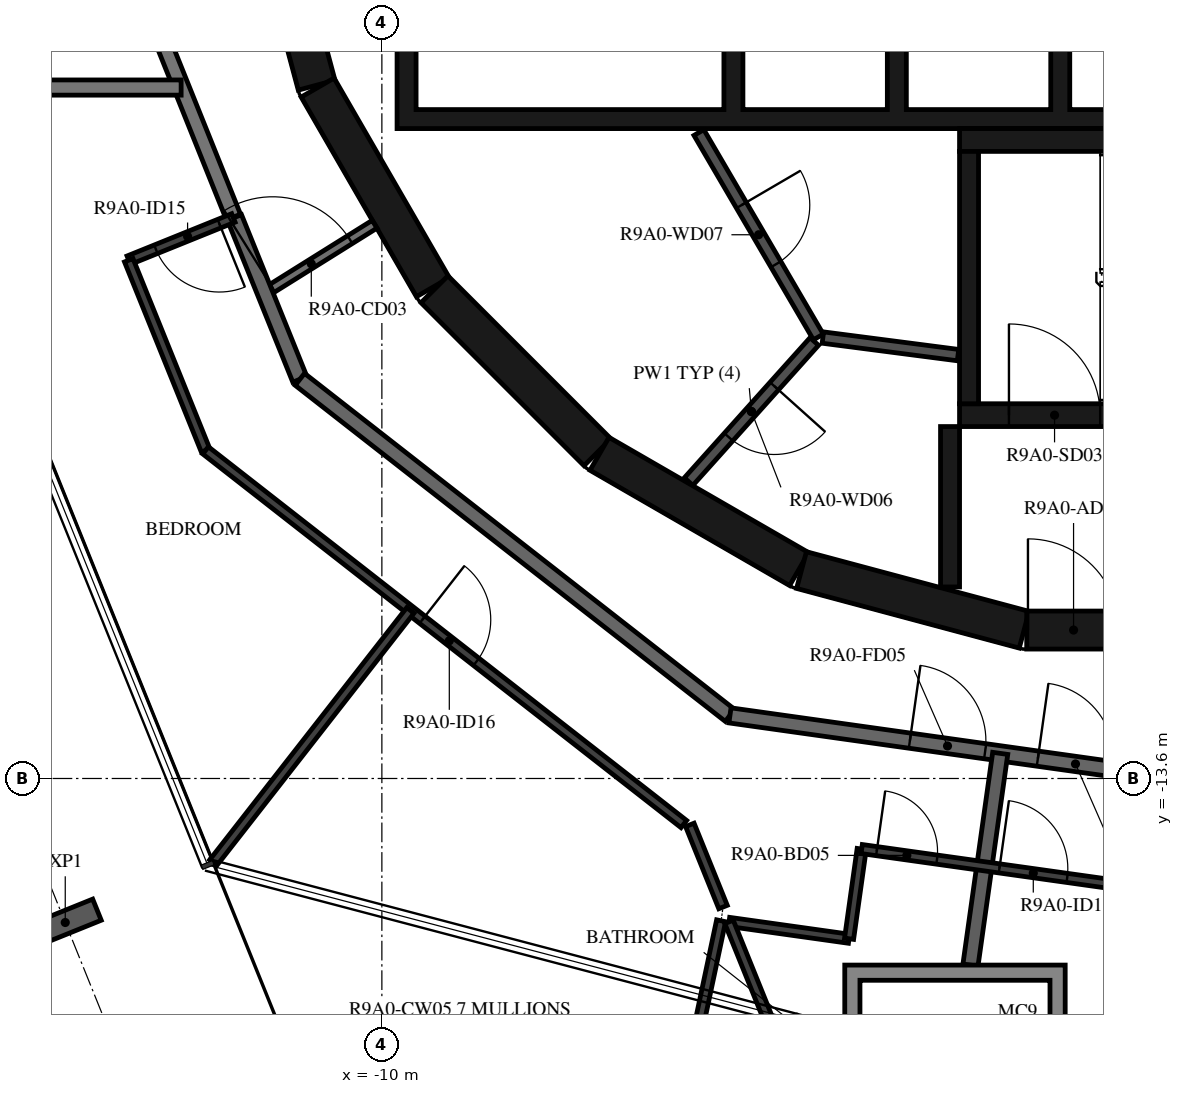
"""IFC4 building model, lengths in metres.
Left out: names, types, materials, properties, quantities, classifications, styles, units other than length and angle.
Written with IfcOpenShell. Run it as: python <this file> out.ifc"""

import sys

from ifc_helpers import new_model, si_unit, direction, frame, frame_2d, origin, origin_2d, place, context, subcontext, project, spatial, polyline, rectangle, i_section, outline, extrude, element, fill, save


model = new_model("IFC4")
c1 = context("Model", 3, precision=1e-05, world=origin(), true_north=direction((0.0, 1.0)))
c2 = subcontext(c1, "Body", "Model", "MODEL_VIEW")
j1 = project(units=[si_unit("LENGTHUNIT", "METRE"), si_unit("PLANEANGLEUNIT", "RADIAN")], contexts=[c1])
p1 = place(None, origin())
s1 = spatial("IfcSite", under=j1, at=p1, CompositionType="ELEMENT")
p2 = place(p1, origin())
s2 = spatial("IfcBuilding", under=s1, at=p2, CompositionType="ELEMENT")
p3 = place(p2, frame((0.0, 0.0, 340.0)))
s3 = spatial("IfcBuildingStorey", under=s2, at=p3, CompositionType="ELEMENT", Elevation=340.0)
p4 = place(p3, frame((-14.166, -15.495, -0.38), z_axis=(0.0, 0.0, 1.0), x_axis=(-0.374606892434, 0.927183733755, 0.0)))
e1 = element("IfcColumn", 1, at=p4, inside=s3, PredefinedType="COLUMN", context=c2, shape_type="SweptSolid", body=[
    extrude(i_section(OverallWidth=0.3, OverallDepth=0.9, WebThickness=0.019, FlangeThickness=0.035, FilletRadius=0.03, at=origin_2d()), origin(), (0.0, 0.0, 1.0), 3.5),
])
p5 = place(p3, frame((-11.643, -1.55, 0.0), z_axis=(0.0, 0.0, 1.0), x_axis=(0.258734743916, -0.965948410781, 0.0)))
e2 = element("IfcWall", 2, at=p5, inside=s3, PredefinedType="SHEAR", context=c2, shape_type="SweptSolid", body=[
    extrude(rectangle(XDim=3.033, YDim=0.5, at=frame_2d((1.516, 0.0))), origin(), (0.0, 0.0, 1.0), 3.12),
])
p6 = place(p5, frame((1.066, 0.0, 0.0)))
e3 = element("IfcOpeningElement", 3, at=p6, cuts=e2, PredefinedType="OPENING", context=c2, shape_type="SweptSolid", body=[
    extrude(rectangle(XDim=0.9, YDim=2.1, at=frame_2d((0.45, 1.05))), frame((0.0, 0.26, 0.0), z_axis=(0.0, -1.0, 0.0), x_axis=(1.0, 0.0, 0.0)), (0.0, 0.0, 1.0), 0.52),
])
p7 = place(p3, frame((-10.845, -4.51, 0.0), z_axis=(0.0, 0.0, 1.0), x_axis=(0.500087131594, -0.865975092491, 0.0)))
e4 = element("IfcWall", 4, at=p7, inside=s3, PredefinedType="SHEAR", context=c2, shape_type="SweptSolid", body=[
    extrude(rectangle(XDim=3.033, YDim=0.5, at=frame_2d((1.516, 0.0))), origin(), (0.0, 0.0, 1.0), 3.12),
])
p8 = place(p3, frame((-9.308, -7.164, 0.0), z_axis=(0.0, 0.0, 1.0), x_axis=(0.707106781187, -0.707106781187, 0.0)))
e5 = element("IfcWall", 5, at=p8, inside=s3, PredefinedType="SHEAR", context=c2, shape_type="SweptSolid", body=[
    extrude(rectangle(XDim=3.032, YDim=0.5, at=frame_2d((1.516, 0.0))), origin(), (0.0, 0.0, 1.0), 3.12),
])
for number, where, z_axis, x_axis in (
    (6, (-7.137, -9.329, 0.0), (0.0, 0.0, 1.0), (0.866, -0.5, 0.0)),
    (7, (-4.479, -10.858, 0.0), (0.0, 0.0, 1.0), (0.966, -0.259, 0.0)),
):
    element("IfcWall", number, at=place(p3, frame(where, z_axis=z_axis, x_axis=x_axis)), inside=s3, PredefinedType="SHEAR", context=c2, shape_type="SweptSolid", body=[
        extrude(rectangle(XDim=3.033, YDim=0.5, at=frame_2d((1.516, 0.0))), origin(), (0.0, 0.0, 1.0), 3.12),
    ])
p9 = place(p3, frame((-1.516, -11.647, 0.0), z_axis=(0.0, 0.0, 1.0), x_axis=(1.0, 0.0, 0.0)))
e8 = element("IfcWall", 8, at=p9, inside=s3, PredefinedType="SHEAR", context=c2, shape_type="SweptSolid", body=[
    extrude(rectangle(XDim=3.033, YDim=0.5, at=frame_2d((1.516, 0.0))), origin(), (0.0, 0.0, 1.0), 3.12),
])
p10 = place(p9, frame((0.016, 0.0, 0.0)))
e9 = element("IfcOpeningElement", 9, at=p10, cuts=e8, PredefinedType="OPENING", context=c2, shape_type="SweptSolid", body=[
    extrude(rectangle(XDim=1.2, YDim=2.1, at=frame_2d((0.6, 1.05))), frame((0.0, 0.26, 0.0), z_axis=(0.0, -1.0, 0.0), x_axis=(1.0, 0.0, 0.0)), (0.0, 0.0, 1.0), 0.52),
])
p11 = place(p3, frame((-2.275, -8.67, 0.0), z_axis=(0.0, 0.0, 1.0), x_axis=(0.0, 1.0, 0.0)))
e10 = element("IfcWall", 10, at=p11, inside=s3, PredefinedType="SHEAR", context=c2, shape_type="SweptSolid", body=[
    extrude(rectangle(XDim=3.32, YDim=0.25, at=frame_2d((1.66, 0.0))), origin(), (0.0, 0.0, 1.0), 3.12),
])
p12 = place(p3, frame((-2.4, -5.2, 0.0), z_axis=(0.0, 0.0, 1.0), x_axis=(1.0, 0.0, 0.0)))
e11 = element("IfcWall", 11, at=p12, inside=s3, PredefinedType="SHEAR", context=c2, shape_type="SweptSolid", body=[
    extrude(rectangle(XDim=7.05, YDim=0.3, at=frame_2d((3.525, 0.0))), origin(), (0.0, 0.0, 1.0), 3.12),
])
p13 = place(p3, frame((-2.4, -8.82, 0.0), z_axis=(0.0, 0.0, 1.0), x_axis=(1.0, 0.0, 0.0)))
e12 = element("IfcWall", 12, at=p13, inside=s3, PredefinedType="SHEAR", context=c2, shape_type="SweptSolid", body=[
    extrude(rectangle(XDim=2.5, YDim=0.3, at=frame_2d((1.25, 0.0))), origin(), (0.0, 0.0, 1.0), 3.12),
])
p14 = place(p13, frame((0.65, 0.0, 0.0)))
e13 = element("IfcOpeningElement", 13, at=p14, cuts=e12, PredefinedType="OPENING", context=c2, shape_type="SweptSolid", body=[
    extrude(rectangle(XDim=1.2, YDim=2.1, at=frame_2d((0.6, 1.05))), frame((0.0, 0.16, 0.0), z_axis=(0.0, -1.0, 0.0), x_axis=(1.0, 0.0, 0.0)), (0.0, 0.0, 1.0), 0.32),
])
p15 = place(p3, frame((-2.525, -8.97, 0.0), z_axis=(0.0, 0.0, 1.0), x_axis=(0.0, -1.0, 0.0)))
e14 = element("IfcWall", 14, at=p15, inside=s3, PredefinedType="SHEAR", context=c2, shape_type="SweptSolid", body=[
    extrude(rectangle(XDim=2.11, YDim=0.25, at=frame_2d((1.055, 0.0))), origin(), (0.0, 0.0, 1.0), 3.12),
])
p16 = place(p3, origin())
e15 = element("IfcWall", 15, at=p16, inside=s3, PredefinedType="SHEAR", context=c2, shape_type="SweptSolid", body=[
    extrude(outline(polyline([(9.8, -5.05), (9.8, -4.8), (9.8, -1.9), (9.55, -1.9), (9.55, -4.8), (7.65, -4.8), (7.65, -1.9), (7.4, -1.9), (7.4, -4.8), (5.5, -4.8), (5.5, -1.9), (5.25, -1.9), (5.25, -4.8), (3.35, -4.8), (3.35, -1.9), (3.1, -1.9), (3.1, -4.8), (1.2, -4.8), (1.2, -1.9), (0.95, -1.9), (0.95, -4.8), (-0.95, -4.8), (-0.95, -1.9), (-1.2, -1.9), (-1.2, -4.8), (-3.1, -4.8), (-3.1, -1.9), (-3.35, -1.9), (-3.35, -4.8), (-5.25, -4.8), (-5.25, -1.9), (-5.5, -1.9), (-5.5, -4.8), (-9.55, -4.8), (-9.55, -1.9), (-9.8, -1.9), (-9.8, -4.8), (-9.8, -5.05), (9.8, -5.05)])), origin(), (0.0, 0.0, 1.0), 3.12),
])
p17 = place(p3, frame((-5.829, -5.102, 0.0), z_axis=(0.0, 0.0, 1.0), x_axis=(0.504480008384, -0.863423373057, 0.0)))
e16 = element("IfcWall", 16, at=p17, inside=s3, PredefinedType="PARTITIONING", context=c2, shape_type="SweptSolid", body=[
    extrude(rectangle(XDim=3.115, YDim=0.15, at=frame_2d((1.558, 0.0))), origin(), (0.0, 0.0, 1.0), 3.12),
])
p18 = place(p17, frame((1.107, 0.0, 0.0)))
e17 = element("IfcOpeningElement", 17, at=p18, cuts=e16, PredefinedType="OPENING", context=c2, shape_type="SweptSolid", body=[
    extrude(rectangle(XDim=0.9, YDim=2.1, at=frame_2d((0.45, 1.05))), frame((0.0, 0.085, 0.0), z_axis=(0.0, -1.0, 0.0), x_axis=(1.0, 0.0, 0.0)), (0.0, 0.0, 1.0), 0.17),
])
p19 = place(p3, frame((-4.311, -7.851, 0.0), z_axis=(0.0, 0.0, 1.0), x_axis=(-0.667869133096, -0.744278725383, 0.0)))
e18 = element("IfcWall", 18, at=p19, inside=s3, PredefinedType="PARTITIONING", context=c2, shape_type="SweptSolid", body=[
    extrude(rectangle(XDim=2.476, YDim=0.15, at=frame_2d((1.238, 0.0))), origin(), (0.0, 0.0, 1.0), 3.12),
])
p20 = place(p19, frame((0.788, 0.0, 0.0)))
e19 = element("IfcOpeningElement", 19, at=p20, cuts=e18, PredefinedType="OPENING", context=c2, shape_type="SweptSolid", body=[
    extrude(rectangle(XDim=0.9, YDim=2.1, at=frame_2d((0.45, 1.05))), frame((0.0, 0.085, 0.0), z_axis=(0.0, -1.0, 0.0), x_axis=(1.0, 0.0, 0.0)), (0.0, 0.0, 1.0), 0.17),
])
p21 = place(p3, frame((-4.198, -7.799, 0.0), z_axis=(0.0, 0.0, 1.0), x_axis=(0.991686747293, -0.128675542523, 0.0)))
e20 = element("IfcWall", 20, at=p21, inside=s3, PredefinedType="PARTITIONING", context=c2, shape_type="SweptSolid", body=[
    extrude(rectangle(XDim=1.793, YDim=0.15, at=frame_2d((0.896, 0.0))), origin(), (0.0, 0.0, 1.0), 3.12),
])
p22 = place(p3, frame((-11.539, -7.21, 0.0), z_axis=(0.0, 0.0, 1.0), x_axis=(0.848103039868, 0.529831325769, 0.0)))
e21 = element("IfcWall", 21, at=p22, inside=s3, PredefinedType="PARTITIONING", context=c2, shape_type="SweptSolid", body=[
    extrude(rectangle(XDim=1.702, YDim=0.12, at=frame_2d((0.851, 0.0))), origin(), (0.0, 0.0, 1.0), 3.12),
])
p23 = place(p22, frame((0.12, 0.0, 0.0)))
e22 = element("IfcOpeningElement", 22, at=p23, cuts=e21, PredefinedType="OPENING", context=c2, shape_type="SweptSolid", body=[
    extrude(rectangle(XDim=1.2, YDim=2.1, at=frame_2d((0.6, 1.05))), frame((0.0, 0.07, 0.0), z_axis=(0.0, -1.0, 0.0), x_axis=(1.0, 0.0, 0.0)), (0.0, 0.0, 1.0), 0.14),
])
p24 = place(p3, frame((-13.769, -1.691, 0.0), z_axis=(0.0, 0.0, 1.0), x_axis=(0.372720094028, -0.927943819155, 0.0)))
e23 = element("IfcWall", 23, at=p24, inside=s3, PredefinedType="STANDARD", context=c2, shape_type="SweptSolid", body=[
    extrude(rectangle(XDim=4.875, YDim=0.2, at=frame_2d((2.438, 0.0))), origin(), (0.0, 0.0, 1.0), 3.12),
])
p25 = place(p3, frame((-11.939, -6.22, 0.0), z_axis=(0.0, 0.0, 1.0), x_axis=(0.374651128394, -0.927165860024, 0.0)))
e24 = element("IfcWall", 24, at=p25, inside=s3, PredefinedType="STANDARD", context=c2, shape_type="SweptSolid", body=[
    extrude(rectangle(XDim=2.296, YDim=0.2, at=frame_2d((1.148, 0.0))), origin(), (0.0, 0.0, 1.0), 3.12),
])
p26 = place(p3, frame((-11.079, -8.349, 0.0), z_axis=(0.0, 0.0, 1.0), x_axis=(0.78800478687, -0.615669112324, 0.0)))
e25 = element("IfcWall", 25, at=p26, inside=s3, PredefinedType="STANDARD", context=c2, shape_type="SweptSolid", body=[
    extrude(rectangle(XDim=7.181, YDim=0.2, at=frame_2d((3.591, 0.0))), origin(), (0.0, 0.0, 1.0), 3.12),
])
p27 = place(p3, frame((-5.42, -12.77, 0.0), z_axis=(0.0, 0.0, 1.0), x_axis=(0.990270565508, -0.139155334385, 0.0)))
e26 = element("IfcWall", 26, at=p27, inside=s3, PredefinedType="STANDARD", context=c2, shape_type="SweptSolid", body=[
    extrude(rectangle(XDim=7.181, YDim=0.2, at=frame_2d((3.59, 0.0))), origin(), (0.0, 0.0, 1.0), 3.12),
])
p28 = place(p27, frame((2.39, 0.0, 0.0)))
e27 = element("IfcOpeningElement", 27, at=p28, cuts=e26, PredefinedType="OPENING", context=c2, shape_type="SweptSolid", body=[
    extrude(rectangle(XDim=1.0, YDim=2.1, at=frame_2d((0.5, 1.05))), frame((0.0, 0.11, 0.0), z_axis=(0.0, -1.0, 0.0), x_axis=(1.0, 0.0, 0.0)), (0.0, 0.0, 1.0), 0.22),
])
p29 = place(p27, frame((4.091, 0.0, 0.0)))
e28 = element("IfcOpeningElement", 28, at=p29, cuts=e26, PredefinedType="OPENING", context=c2, shape_type="SweptSolid", body=[
    extrude(rectangle(XDim=1.0, YDim=2.1, at=frame_2d((0.5, 1.05))), frame((0.0, 0.11, 0.0), z_axis=(0.0, -1.0, 0.0), x_axis=(1.0, 0.0, 0.0)), (0.0, 0.0, 1.0), 0.22),
])
p30 = place(p3, frame((-15.074, -4.51, 0.0), z_axis=(0.0, 0.0, 1.0), x_axis=(1.0, 0.0, 0.0)))
e29 = element("IfcWall", 29, at=p30, inside=s3, PredefinedType="STANDARD", context=c2, shape_type="SweptSolid", body=[
    extrude(rectangle(XDim=2.433, YDim=0.2, at=frame_2d((1.216, 0.0))), origin(), (0.0, 0.0, 1.0), 3.12),
])
p31 = place(p3, frame((-2.256, -16.055, 0.0), z_axis=(0.0, 0.0, 1.0), x_axis=(0.139148428478, 0.990271535919, 0.0)))
e30 = element("IfcWall", 30, at=p31, inside=s3, PredefinedType="STANDARD", context=c2, shape_type="SweptSolid", body=[
    extrude(rectangle(XDim=2.812, YDim=0.2, at=frame_2d((1.406, 0.0))), origin(), (0.0, 0.0, 1.0), 3.12),
])
p32 = place(p3, frame((-11.953, -6.225, 0.0), z_axis=(0.0, 0.0, 1.0), x_axis=(-0.927144096717, -0.374704982518, 0.0)))
e31 = element("IfcWall", 31, at=p32, inside=s3, PredefinedType="PARTITIONING", context=c2, shape_type="SweptSolid", body=[
    extrude(rectangle(XDim=1.485, YDim=0.12, at=frame_2d((0.742, 0.0))), origin(), (0.0, 0.0, 1.0), 3.12),
])
p33 = place(p32, frame((0.2, 0.0, 0.0)))
e32 = element("IfcOpeningElement", 32, at=p33, cuts=e31, PredefinedType="OPENING", context=c2, shape_type="SweptSolid", body=[
    extrude(rectangle(XDim=0.9, YDim=2.1, at=frame_2d((0.45, 1.05))), frame((0.0, 0.07, 0.0), z_axis=(0.0, -1.0, 0.0), x_axis=(1.0, 0.0, 0.0)), (0.0, 0.0, 1.0), 0.14),
])
p34 = place(p3, frame((-13.33, -6.782, 0.0), z_axis=(0.0, 0.0, 1.0), x_axis=(0.374602180132, -0.927185637637, 0.0)))
e33 = element("IfcWall", 33, at=p34, inside=s3, PredefinedType="PARTITIONING", context=c2, shape_type="SweptSolid", body=[
    extrude(rectangle(XDim=2.698, YDim=0.12, at=frame_2d((1.349, 0.0))), origin(), (0.0, 0.0, 1.0), 3.12),
])
p35 = place(p3, frame((-12.319, -9.283, 0.0), z_axis=(0.0, 0.0, 1.0), x_axis=(0.788000268464, -0.61567489546, 0.0)))
e34 = element("IfcWall", 34, at=p35, inside=s3, PredefinedType="PARTITIONING", context=c2, shape_type="SweptSolid", body=[
    extrude(rectangle(XDim=7.985, YDim=0.12, at=frame_2d((3.992, 0.0))), origin(), (0.0, 0.0, 1.0), 3.12),
])
p36 = place(p35, frame((3.619, 0.0, 0.0)))
e35 = element("IfcOpeningElement", 35, at=p36, cuts=e34, PredefinedType="OPENING", context=c2, shape_type="SweptSolid", body=[
    extrude(rectangle(XDim=0.9, YDim=2.1, at=frame_2d((0.45, 1.05))), frame((0.0, 0.07, 0.0), z_axis=(0.0, -1.0, 0.0), x_axis=(1.0, 0.0, 0.0)), (0.0, 0.0, 1.0), 0.14),
])
p37 = place(p3, frame((-5.948, -14.21, 0.0), z_axis=(0.0, 0.0, 1.0), x_axis=(0.374601530156, -0.927185900241, 0.0)))
e36 = element("IfcWall", 36, at=p37, inside=s3, PredefinedType="PARTITIONING", context=c2, shape_type="SweptSolid", body=[
    extrude(rectangle(XDim=1.166, YDim=0.12, at=frame_2d((0.583, 0.0))), origin(), (0.0, 0.0, 1.0), 3.12),
])
p38 = place(p3, frame((-5.433, -15.487, 0.0), z_axis=(0.0, 0.0, 1.0), x_axis=(0.990268451053, -0.139170380644, 0.0)))
e37 = element("IfcWall", 37, at=p38, inside=s3, PredefinedType="PARTITIONING", context=c2, shape_type="SweptSolid", body=[
    extrude(rectangle(XDim=1.595, YDim=0.12, at=frame_2d((0.797, 0.0))), origin(), (0.0, 0.0, 1.0), 3.12),
])
p39 = place(p3, frame((-3.854, -15.708, 0.0), z_axis=(0.0, 0.0, 1.0), x_axis=(0.139298773474, 0.99025039849, 0.0)))
e38 = element("IfcWall", 38, at=p39, inside=s3, PredefinedType="PARTITIONING", context=c2, shape_type="SweptSolid", body=[
    extrude(rectangle(XDim=1.192, YDim=0.12, at=frame_2d((0.596, 0.0))), origin(), (0.0, 0.0, 1.0), 3.12),
])
p40 = place(p3, frame((-3.688, -14.528, 0.0), z_axis=(0.0, 0.0, 1.0), x_axis=(0.990273698817, -0.139133035013, 0.0)))
e39 = element("IfcWall", 39, at=p40, inside=s3, PredefinedType="PARTITIONING", context=c2, shape_type="SweptSolid", body=[
    extrude(rectangle(XDim=4.945, YDim=0.12, at=frame_2d((2.472, 0.0))), origin(), (0.0, 0.0, 1.0), 3.12),
])
p41 = place(p40, frame((0.2, 0.0, 0.0)))
e40 = element("IfcOpeningElement", 40, at=p41, cuts=e39, PredefinedType="OPENING", context=c2, shape_type="SweptSolid", body=[
    extrude(rectangle(XDim=0.8, YDim=2.1, at=frame_2d((0.4, 1.05))), frame((0.0, 0.07, 0.0), z_axis=(0.0, -1.0, 0.0), x_axis=(1.0, 0.0, 0.0)), (0.0, 0.0, 1.0), 0.14),
])
p42 = place(p40, frame((1.83, 0.0, 0.0)))
e41 = element("IfcOpeningElement", 41, at=p42, cuts=e39, PredefinedType="OPENING", context=c2, shape_type="SweptSolid", body=[
    extrude(rectangle(XDim=0.9, YDim=2.1, at=frame_2d((0.45, 1.05))), frame((0.0, 0.07, 0.0), z_axis=(0.0, -1.0, 0.0), x_axis=(1.0, 0.0, 0.0)), (0.0, 0.0, 1.0), 0.14),
])
p43 = place(p3, frame((-12.219, -14.708, 0.0), z_axis=(0.0, 0.0, 1.0), x_axis=(0.615656413137, 0.788014708596, 0.0)))
e42 = element("IfcWall", 42, at=p43, inside=s3, PredefinedType="PARTITIONING", context=c2, shape_type="SweptSolid", body=[
    extrude(rectangle(XDim=4.213, YDim=0.12, at=frame_2d((2.106, 0.0))), origin(), (0.0, 0.0, 1.0), 3.12),
])
p44 = place(p3, frame((-7.305, -23.815, 0.0), z_axis=(0.0, 0.0, 1.0), x_axis=(0.207366409306, 0.978263345062, 0.0)))
e43 = element("IfcWall", 43, at=p44, inside=s3, PredefinedType="PARTITIONING", context=c2, shape_type="SweptSolid", body=[
    extrude(rectangle(XDim=8.529, YDim=0.12, at=frame_2d((4.264, 0.0))), origin(), (0.0, 0.0, 1.0), 3.12),
])
p45 = place(p44, frame((0.4, 0.0, 0.0)))
e44 = element("IfcOpeningElement", 44, at=p45, cuts=e43, PredefinedType="OPENING", context=c2, shape_type="SweptSolid", body=[
    extrude(rectangle(XDim=0.9, YDim=2.1, at=frame_2d((0.45, 1.05))), frame((0.0, 0.07, 0.0), z_axis=(0.0, -1.0, 0.0), x_axis=(1.0, 0.0, 0.0)), (0.0, 0.0, 1.0), 0.14),
])
p46 = place(p3, frame((-4.445, -17.93, 0.0), z_axis=(0.0, 0.0, 1.0), x_axis=(-0.374614676827, 0.927180588616, 0.0)))
e45 = element("IfcWall", 45, at=p46, inside=s3, PredefinedType="PARTITIONING", context=c2, shape_type="SweptSolid", body=[
    extrude(rectangle(XDim=2.635, YDim=0.12, at=frame_2d((1.318, 0.0))), origin(), (0.0, 0.0, 1.0), 3.12),
])
p47 = place(p3, origin())
e46 = element("IfcWall", 46, at=p47, inside=s3, PredefinedType="STANDARD", context=c2, shape_type="SweptSolid", body=[
    extrude(outline(polyline([(-1.01, -16.055), (-1.01, -18.955), (-3.91, -18.955), (-3.91, -16.055), (-1.01, -16.055)]), holes=[polyline([(-3.71, -18.755), (-1.21, -18.755), (-1.21, -16.255), (-3.71, -16.255), (-3.71, -18.755)])]), origin(), (0.0, 0.0, 1.0), 3.12),
])
p48 = place(p14, origin())
e47 = element("IfcDoor", 47, at=p48, inside=s3, OperationType="SINGLE_SWING_LEFT", PredefinedType="DOOR", context=c2, shape_type="SweptSolid", body=[
    extrude(rectangle(XDim=1.2, YDim=2.1, at=frame_2d((0.6, 1.05))), frame((0.0, 0.025, 0.0), z_axis=(0.0, -1.0, 0.0), x_axis=(1.0, 0.0, 0.0)), (0.0, 0.0, 1.0), 0.05),
])
fill(e13, e47)
p49 = place(p10, origin())
e48 = element("IfcDoor", 48, at=p49, inside=s3, OperationType="SINGLE_SWING_RIGHT", PredefinedType="DOOR", context=c2, shape_type="SweptSolid", body=[
    extrude(rectangle(XDim=1.2, YDim=2.1, at=frame_2d((0.6, 1.05))), frame((0.0, 0.025, 0.0), z_axis=(0.0, -1.0, 0.0), x_axis=(1.0, 0.0, 0.0)), (0.0, 0.0, 1.0), 0.05),
])
fill(e9, e48)
p50 = place(p20, origin())
e49 = element("IfcDoor", 49, at=p50, inside=s3, OperationType="SINGLE_SWING_RIGHT", PredefinedType="DOOR", context=c2, shape_type="SweptSolid", body=[
    extrude(rectangle(XDim=0.9, YDim=2.1, at=frame_2d((0.45, 1.05))), frame((0.0, 0.025, 0.0), z_axis=(0.0, -1.0, 0.0), x_axis=(1.0, 0.0, 0.0)), (0.0, 0.0, 1.0), 0.05),
])
fill(e19, e49)
p51 = place(p18, origin())
e50 = element("IfcDoor", 50, at=p51, inside=s3, OperationType="SINGLE_SWING_LEFT", PredefinedType="DOOR", context=c2, shape_type="SweptSolid", body=[
    extrude(rectangle(XDim=0.9, YDim=2.1, at=frame_2d((0.45, 1.05))), frame((0.0, 0.025, 0.0), z_axis=(0.0, -1.0, 0.0), x_axis=(1.0, 0.0, 0.0)), (0.0, 0.0, 1.0), 0.05),
])
fill(e17, e50)
p52 = place(p28, origin())
e51 = element("IfcDoor", 51, at=p52, inside=s3, OperationType="SINGLE_SWING_RIGHT", PredefinedType="DOOR", context=c2, shape_type="SweptSolid", body=[
    extrude(rectangle(XDim=1.0, YDim=2.1, at=frame_2d((0.5, 1.05))), frame((0.0, 0.025, 0.0), z_axis=(0.0, -1.0, 0.0), x_axis=(1.0, 0.0, 0.0)), (0.0, 0.0, 1.0), 0.05),
])
fill(e27, e51)
p53 = place(p33, origin())
e52 = element("IfcDoor", 52, at=p53, inside=s3, OperationType="SINGLE_SWING_LEFT", PredefinedType="DOOR", context=c2, shape_type="SweptSolid", body=[
    extrude(rectangle(XDim=0.9, YDim=2.1, at=frame_2d((0.45, 1.05))), frame((0.0, 0.025, 0.0), z_axis=(0.0, -1.0, 0.0), x_axis=(1.0, 0.0, 0.0)), (0.0, 0.0, 1.0), 0.05),
])
fill(e32, e52)
p54 = place(p36, origin())
e53 = element("IfcDoor", 53, at=p54, inside=s3, OperationType="SINGLE_SWING_RIGHT", PredefinedType="DOOR", context=c2, shape_type="SweptSolid", body=[
    extrude(rectangle(XDim=0.9, YDim=2.1, at=frame_2d((0.45, 1.05))), frame((0.0, 0.025, 0.0), z_axis=(0.0, -1.0, 0.0), x_axis=(1.0, 0.0, 0.0)), (0.0, 0.0, 1.0), 0.05),
])
fill(e35, e53)
p55 = place(p41, origin())
e54 = element("IfcDoor", 54, at=p55, inside=s3, OperationType="SINGLE_SWING_RIGHT", PredefinedType="DOOR", context=c2, shape_type="SweptSolid", body=[
    extrude(rectangle(XDim=0.8, YDim=2.1, at=frame_2d((0.4, 1.05))), frame((0.0, 0.025, 0.0), z_axis=(0.0, -1.0, 0.0), x_axis=(1.0, 0.0, 0.0)), (0.0, 0.0, 1.0), 0.05),
])
fill(e40, e54)
p56 = place(p29, origin())
e55 = element("IfcDoor", 55, at=p56, inside=s3, OperationType="SINGLE_SWING_RIGHT", PredefinedType="DOOR", context=c2, shape_type="SweptSolid", body=[
    extrude(rectangle(XDim=1.0, YDim=2.1, at=frame_2d((0.5, 1.05))), frame((0.0, 0.025, 0.0), z_axis=(0.0, -1.0, 0.0), x_axis=(1.0, 0.0, 0.0)), (0.0, 0.0, 1.0), 0.05),
])
fill(e28, e55)
p57 = place(p42, origin())
e56 = element("IfcDoor", 56, at=p57, inside=s3, OperationType="SINGLE_SWING_RIGHT", PredefinedType="DOOR", context=c2, shape_type="SweptSolid", body=[
    extrude(rectangle(XDim=0.9, YDim=2.1, at=frame_2d((0.45, 1.05))), frame((0.0, 0.025, 0.0), z_axis=(0.0, -1.0, 0.0), x_axis=(1.0, 0.0, 0.0)), (0.0, 0.0, 1.0), 0.05),
])
fill(e41, e56)
p58 = place(p23, origin())
e57 = element("IfcDoor", 57, at=p58, inside=s3, OperationType="DOUBLE_DOOR_SINGLE_SWING", PredefinedType="DOOR", context=c2, shape_type="SweptSolid", body=[
    extrude(rectangle(XDim=1.2, YDim=2.1, at=frame_2d((0.6, 1.05))), frame((0.0, 0.025, 0.0), z_axis=(0.0, -1.0, 0.0), x_axis=(1.0, 0.0, 0.0)), (0.0, 0.0, 1.0), 0.05),
])
fill(e22, e57)
save(model, sys.argv[1])
